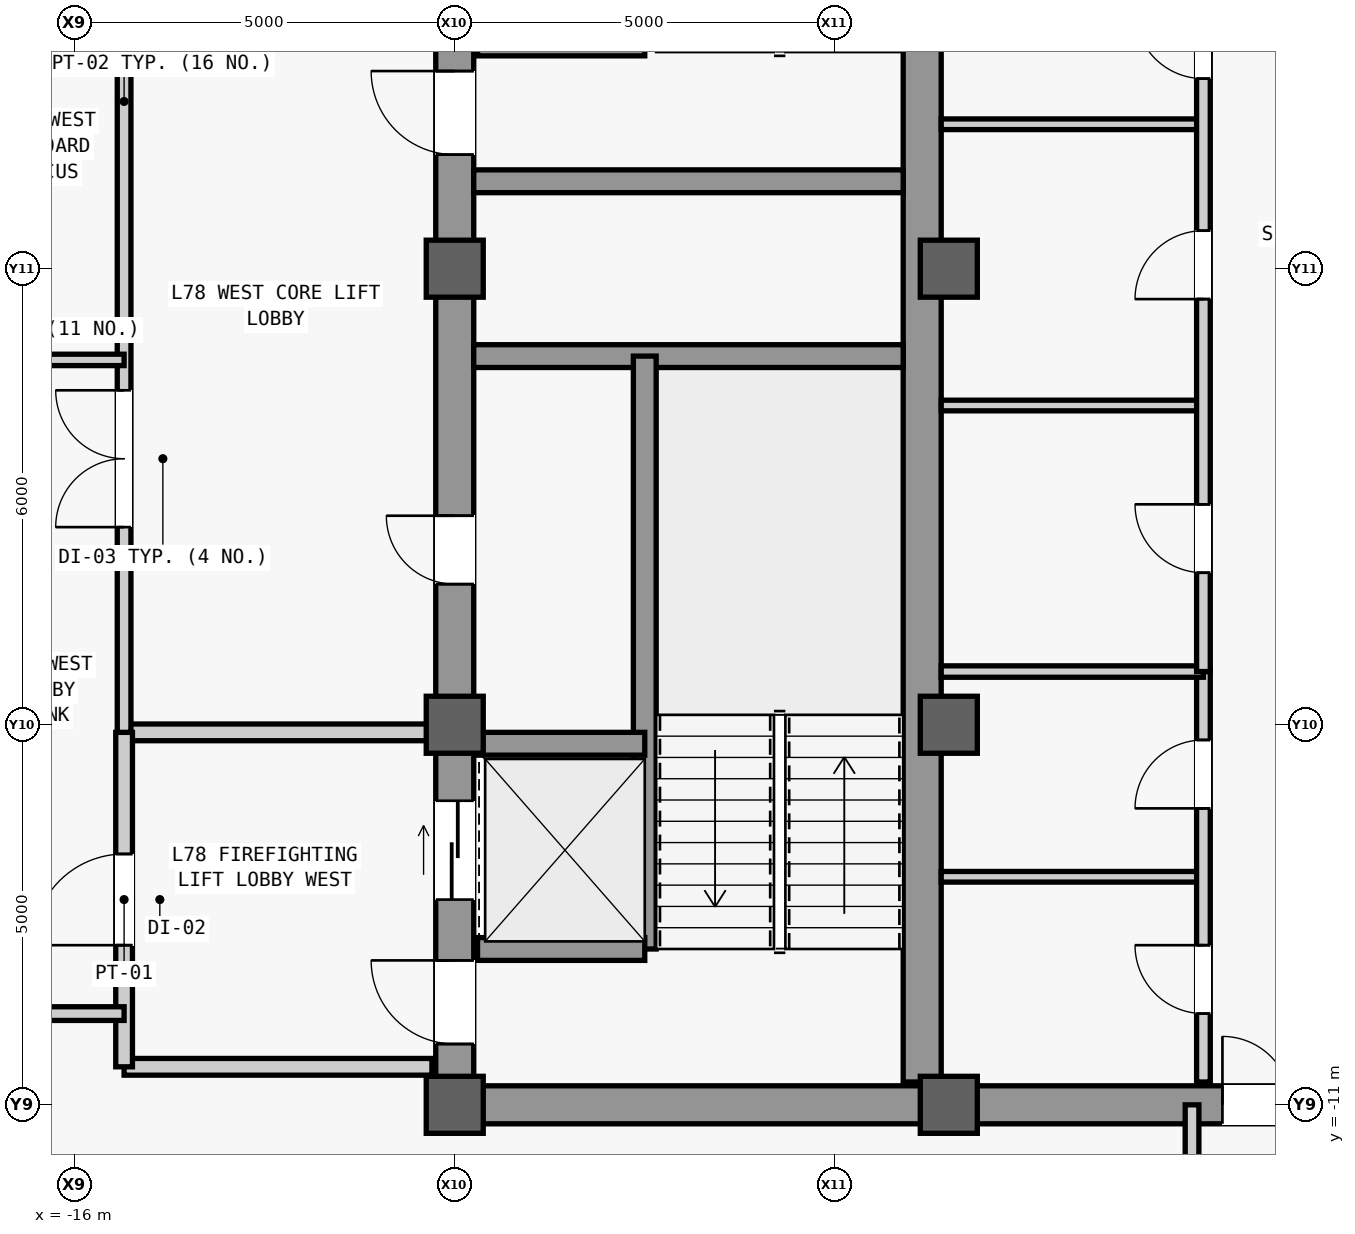
"""IFC4 building model, lengths in metres.
Left out: names, types, materials, properties, quantities, classifications, styles, units other than length and angle.
Written with IfcOpenShell. Run it as: python <this file> out.ifc"""

import sys

from ifc_helpers import new_model, si_unit, direction, frame, frame_2d, origin, origin_2d, place, context, subcontext, project, spatial, rectangle, extrude, source, transform, mapped, element, fill, save


model = new_model("IFC4")
c1 = context("Model", 3, precision=1e-05, world=origin(), true_north=direction((0.0, 1.0)))
c2 = subcontext(c1, "Body", "Model", "MODEL_VIEW")
j1 = project(units=[si_unit("LENGTHUNIT", "METRE"), si_unit("PLANEANGLEUNIT", "RADIAN")], contexts=[c1])
p1 = place(None, origin())
s1 = spatial("IfcSite", under=j1, at=p1, CompositionType="ELEMENT")
p2 = place(p1, origin())
s2 = spatial("IfcBuilding", under=s1, at=p2, CompositionType="ELEMENT")
p3 = place(p2, frame((0.0, 0.0, 330.3)))
s3 = spatial("IfcBuildingStorey", under=s2, at=p3, CompositionType="ELEMENT", Elevation=330.3)
m1 = source(origin(), c2, "Body", "SweptSolid", [
    extrude(rectangle(XDim=22.0, YDim=0.5, at=frame_2d((11.0, 0.0))), origin(), (0.0, 0.0, 1.0), 3.74),
])
p4 = place(p3, frame((-11.0, -11.0, 0.0), z_axis=(0.0, 0.0, 1.0), x_axis=(0.0, 1.0, 0.0)))
e1 = element("IfcWall", 1, at=p4, inside=s3, PredefinedType="SHEAR", context=c2, shape_type="MappedRepresentation", body=[
    mapped(m1, transform((0.0, 0.0, 0.0), scale=1.0)),
])
m2 = source(origin(), c2, "Body", "SweptSolid", [
    extrude(rectangle(XDim=1.1, YDim=2.2, at=frame_2d((0.55, 1.1))), frame((0.0, 0.26, 0.0), z_axis=(0.0, -1.0, 0.0), x_axis=(1.0, 0.0, 0.0)), (0.0, 0.0, 1.0), 0.52),
])
p5 = place(p4, frame((0.8, 0.0, 0.0)))
e2 = element("IfcOpeningElement", 2, at=p5, cuts=e1, PredefinedType="OPENING", context=c2, shape_type="MappedRepresentation", body=[
    mapped(m2, transform((0.0, 0.0, 0.0), scale=1.0)),
])
p6 = place(p4, frame((12.5, 0.0, 0.0)))
e3 = element("IfcOpeningElement", 3, at=p6, cuts=e1, PredefinedType="OPENING", context=c2, shape_type="MappedRepresentation", body=[
    mapped(m2, transform((0.0, 0.0, 0.0), scale=1.0)),
])
m3 = source(origin(), c2, "Body", "SweptSolid", [
    extrude(rectangle(XDim=0.9, YDim=2.15, at=frame_2d((0.45, 1.075))), frame((0.0, 0.26, 0.0), z_axis=(0.0, -1.0, 0.0), x_axis=(1.0, 0.0, 0.0)), (0.0, 0.0, 1.0), 0.52),
])
p7 = place(p4, frame((6.85, 0.0, 0.0)))
e4 = element("IfcOpeningElement", 4, at=p7, cuts=e1, PredefinedType="OPENING", context=c2, shape_type="MappedRepresentation", body=[
    mapped(m3, transform((0.0, 0.0, 0.0), scale=1.0)),
])
m4 = source(origin(), c2, "Body", "SweptSolid", [
    extrude(rectangle(XDim=1.2, YDim=2.3, at=frame_2d((0.6, 1.15))), frame((0.0, 0.26, 0.0), z_axis=(0.0, -1.0, 0.0), x_axis=(1.0, 0.0, 0.0)), (0.0, 0.0, 1.0), 0.52),
])
p8 = place(p4, frame((14.6, 0.0, 0.0)))
e5 = element("IfcOpeningElement", 5, at=p8, cuts=e1, PredefinedType="OPENING", context=c2, shape_type="MappedRepresentation", body=[
    mapped(m4, transform((0.0, 0.0, 0.0), scale=1.0)),
])
p9 = place(p4, frame((18.2, 0.0, 0.0)))
e6 = element("IfcOpeningElement", 6, at=p9, cuts=e1, PredefinedType="OPENING", context=c2, shape_type="MappedRepresentation", body=[
    mapped(m4, transform((0.0, 0.0, 0.0), scale=1.0)),
])
m5 = source(origin(), c2, "Body", "SweptSolid", [
    extrude(rectangle(XDim=1.3, YDim=2.3, at=frame_2d((0.65, 1.15))), frame((0.0, 0.26, 0.0), z_axis=(0.0, -1.0, 0.0), x_axis=(1.0, 0.0, 0.0)), (0.0, 0.0, 1.0), 0.52),
])
p10 = place(p4, frame((2.7, 0.0, 0.0)))
e7 = element("IfcOpeningElement", 7, at=p10, cuts=e1, PredefinedType="OPENING", context=c2, shape_type="MappedRepresentation", body=[
    mapped(m5, transform((0.0, 0.0, 0.0), scale=1.0)),
])
m6 = source(origin(), c2, "Body", "SweptSolid", [
    extrude(rectangle(XDim=21.4, YDim=0.5, at=frame_2d((10.7, 0.0))), origin(), (0.0, 0.0, 1.0), 3.74),
])
p11 = place(p3, frame((-4.85, -10.7, 0.0), z_axis=(0.0, 0.0, 1.0), x_axis=(0.0, 1.0, 0.0)))
e8 = element("IfcWall", 8, at=p11, inside=s3, PredefinedType="SHEAR", context=c2, shape_type="MappedRepresentation", body=[
    mapped(m6, transform((0.0, 0.0, 0.0), scale=1.0)),
])
m7 = source(origin(), c2, "Body", "SweptSolid", [
    extrude(rectangle(XDim=5.9, YDim=0.5, at=frame_2d((2.95, 0.0))), origin(), (0.0, 0.0, 1.0), 3.74),
])
p12 = place(p3, frame((-10.75, -11.0, 0.0), z_axis=(0.0, 0.0, 1.0), x_axis=(1.0, 0.0, 0.0)))
e9 = element("IfcWall", 9, at=p12, inside=s3, PredefinedType="SHEAR", context=c2, shape_type="MappedRepresentation", body=[
    mapped(m7, transform((0.0, 0.0, 0.0), scale=1.0)),
])
m8 = source(origin(), c2, "Body", "SweptSolid", [
    extrude(rectangle(XDim=5.65, YDim=0.3, at=frame_2d((2.825, 0.0))), origin(), (0.0, 0.0, 1.0), 3.74),
])
for number, where, z_axis, x_axis in (
    (10, (-10.75, -1.15, 0.0), (0.0, 0.0, 1.0), (1.0, 0.0, 0.0)),
    (11, (-10.75, 1.15, 0.0), (0.0, 0.0, 1.0), (1.0, 0.0, 0.0)),
):
    element("IfcWall", number, at=place(p3, frame(where, z_axis=z_axis, x_axis=x_axis)), inside=s3, PredefinedType="SHEAR", context=c2, shape_type="MappedRepresentation", body=[
        mapped(m8, transform((0.0, 0.0, 0.0), scale=1.0)),
    ])
m9 = source(origin(), c2, "Body", "SweptSolid", [
    extrude(rectangle(XDim=9.2, YDim=0.5, at=frame_2d((4.6, 0.0))), origin(), (0.0, 0.0, 1.0), 3.74),
])
p13 = place(p3, frame((-4.6, -11.0, 0.0), z_axis=(0.0, 0.0, 1.0), x_axis=(1.0, 0.0, 0.0)))
e12 = element("IfcWall", 12, at=p13, inside=s3, PredefinedType="SHEAR", context=c2, shape_type="MappedRepresentation", body=[
    mapped(m9, transform((0.0, 0.0, 0.0), scale=1.0)),
])
m10 = source(origin(), c2, "Body", "SweptSolid", [
    extrude(rectangle(XDim=1.8, YDim=2.25, at=frame_2d((0.9, 1.125))), frame((0.0, 0.26, 0.0), z_axis=(0.0, -1.0, 0.0), x_axis=(1.0, 0.0, 0.0)), (0.0, 0.0, 1.0), 0.52),
])
p14 = place(p13, frame((3.7, 0.0, 0.0)))
e13 = element("IfcOpeningElement", 13, at=p14, cuts=e12, PredefinedType="OPENING", context=c2, shape_type="MappedRepresentation", body=[
    mapped(m10, transform((0.0, 0.0, 0.0), scale=1.0)),
])
m11 = source(origin(), c2, "Body", "SweptSolid", [
    extrude(rectangle(XDim=0.75, YDim=0.75, at=origin_2d()), origin(), (0.0, 0.0, 1.0), 4.0),
])
for number, where, z_axis, x_axis in (
    (14, (-11.0, -11.0, 0.0), (0.0, 0.0, 1.0), (1.0, 0.0, 0.0)),
    (15, (-11.0, -6.0, 0.0), (0.0, 0.0, 1.0), (1.0, 0.0, 0.0)),
    (16, (-11.0, 0.0, 0.0), (0.0, 0.0, 1.0), (1.0, 0.0, 0.0)),
    (17, (-4.5, -11.0, 0.0), (0.0, 0.0, 1.0), (1.0, 0.0, 0.0)),
    (18, (-4.5, -6.0, 0.0), (0.0, 0.0, 1.0), (1.0, 0.0, 0.0)),
    (19, (-4.5, 0.0, 0.0), (0.0, 0.0, 1.0), (1.0, 0.0, 0.0)),
):
    element("IfcColumn", number, at=place(p3, frame(where, z_axis=z_axis, x_axis=x_axis)), inside=s3, PredefinedType="COLUMN", context=c2, shape_type="MappedRepresentation", body=[
        mapped(m11, transform((0.0, 0.0, 0.0), scale=1.0)),
    ])
m12 = source(origin(), c2, "Body", "SweptSolid", [
    extrude(rectangle(XDim=7.8, YDim=0.3, at=frame_2d((3.9, 0.0))), origin(), (0.0, 0.0, 1.0), 3.74),
])
p15 = place(p3, frame((-8.5, -8.95, 0.0), z_axis=(0.0, 0.0, 1.0), x_axis=(0.0, 1.0, 0.0)))
e20 = element("IfcWall", 20, at=p15, inside=s3, PredefinedType="SHEAR", context=c2, shape_type="MappedRepresentation", body=[
    mapped(m12, transform((0.0, 0.0, 0.0), scale=1.0)),
])
m13 = source(origin(), c2, "Body", "SweptSolid", [
    extrude(rectangle(XDim=2.2, YDim=0.3, at=frame_2d((1.1, 0.0))), origin(), (0.0, 0.0, 1.0), 3.74),
])
for number, where, z_axis, x_axis in (
    (21, (-10.7, -8.95, 0.0), (0.0, 0.0, 1.0), (1.0, 0.0, 0.0)),
    (22, (-10.7, -6.25, 0.0), (0.0, 0.0, 1.0), (1.0, 0.0, 0.0)),
    (23, (-10.7, 2.95, 0.0), (0.0, 0.0, 1.0), (1.0, 0.0, 0.0)),
):
    element("IfcWall", number, at=place(p3, frame(where, z_axis=z_axis, x_axis=x_axis)), inside=s3, PredefinedType="SHEAR", context=c2, shape_type="MappedRepresentation", body=[
        mapped(m13, transform((0.0, 0.0, 0.0), scale=1.0)),
    ])
m14 = source(origin(), c2, "Body", "SweptSolid", [
    extrude(rectangle(XDim=4.05, YDim=0.22, at=frame_2d((2.025, 0.0))), origin(), (0.0, 0.0, 1.0), 3.74),
])
p16 = place(p3, frame((-15.35, -10.5, 0.0), z_axis=(0.0, 0.0, 1.0), x_axis=(1.0, 0.0, 0.0)))
e24 = element("IfcWall", 24, at=p16, inside=s3, PredefinedType="PARTITIONING", context=c2, shape_type="MappedRepresentation", body=[
    mapped(m14, transform((0.0, 0.0, 0.0), scale=1.0)),
])
m15 = source(origin(), c2, "Body", "SweptSolid", [
    extrude(rectangle(XDim=4.05, YDim=0.22, at=frame_2d((2.025, 0.0))), origin(), (0.0, 0.0, 1.0), 3.124),
])
p17 = place(p3, frame((-15.35, -6.1, 0.0), z_axis=(0.0, 0.0, 1.0), x_axis=(1.0, 0.0, 0.0)))
e25 = element("IfcWall", 25, at=p17, inside=s3, PredefinedType="PARTITIONING", context=c2, shape_type="MappedRepresentation", body=[
    mapped(m15, transform((0.0, 0.0, 0.0), scale=1.0)),
])
m16 = source(origin(), c2, "Body", "SweptSolid", [
    extrude(rectangle(XDim=4.4, YDim=0.22, at=frame_2d((2.2, 0.0))), origin(), (0.0, 0.0, 1.0), 3.74),
])
p18 = place(p3, frame((-15.35, -10.5, 0.0), z_axis=(0.0, 0.0, 1.0), x_axis=(0.0, 1.0, 0.0)))
e26 = element("IfcWall", 26, at=p18, inside=s3, PredefinedType="PARTITIONING", context=c2, shape_type="MappedRepresentation", body=[
    mapped(m16, transform((0.0, 0.0, 0.0), scale=1.0)),
])
m17 = source(origin(), c2, "Body", "SweptSolid", [
    extrude(rectangle(XDim=1.2, YDim=2.2, at=frame_2d((0.6, 1.1))), frame((0.0, 0.12, 0.0), z_axis=(0.0, -1.0, 0.0), x_axis=(1.0, 0.0, 0.0)), (0.0, 0.0, 1.0), 0.24),
])
p19 = place(p18, frame((1.6, 0.0, 0.0)))
e27 = element("IfcOpeningElement", 27, at=p19, cuts=e26, PredefinedType="OPENING", context=c2, shape_type="MappedRepresentation", body=[
    mapped(m17, transform((0.0, 0.0, 0.0), scale=1.0)),
])
m18 = source(origin(), c2, "Body", "SweptSolid", [
    extrude(rectangle(XDim=16.6, YDim=0.18, at=frame_2d((8.3, 0.0))), origin(), (0.0, 0.0, 1.0), 3.74),
])
p20 = place(p3, frame((-15.35, -6.1, 0.0), z_axis=(0.0, 0.0, 1.0), x_axis=(0.0, 1.0, 0.0)))
e28 = element("IfcWall", 28, at=p20, inside=s3, PredefinedType="PARTITIONING", context=c2, shape_type="MappedRepresentation", body=[
    mapped(m18, transform((0.0, 0.0, 0.0), scale=1.0)),
])
m19 = source(origin(), c2, "Body", "SweptSolid", [
    extrude(rectangle(XDim=1.8, YDim=2.25, at=frame_2d((0.9, 1.125))), frame((0.0, 0.1, 0.0), z_axis=(0.0, -1.0, 0.0), x_axis=(1.0, 0.0, 0.0)), (0.0, 0.0, 1.0), 0.2),
])
p21 = place(p20, frame((2.7, 0.0, 0.0)))
e29 = element("IfcOpeningElement", 29, at=p21, cuts=e28, PredefinedType="OPENING", context=c2, shape_type="MappedRepresentation", body=[
    mapped(m19, transform((0.0, 0.0, 0.0), scale=1.0)),
])
p22 = place(p20, frame((11.0, 0.0, 0.0)))
e30 = element("IfcOpeningElement", 30, at=p22, cuts=e28, PredefinedType="OPENING", context=c2, shape_type="MappedRepresentation", body=[
    mapped(m19, transform((0.0, 0.0, 0.0), scale=1.0)),
])
m20 = source(origin(), c2, "Body", "SweptSolid", [
    extrude(rectangle(XDim=3.45, YDim=0.14, at=frame_2d((1.725, 0.0))), origin(), (0.0, 0.0, 1.0), 3.74),
])
p23 = place(p3, frame((-4.6, -8.0, 0.0), z_axis=(0.0, 0.0, 1.0), x_axis=(1.0, 0.0, 0.0)))
e31 = element("IfcWall", 31, at=p23, inside=s3, PredefinedType="PARTITIONING", context=c2, shape_type="MappedRepresentation", body=[
    mapped(m20, transform((0.0, 0.0, 0.0), scale=1.0)),
])
m21 = source(origin(), c2, "Body", "SweptSolid", [
    extrude(rectangle(XDim=5.4, YDim=0.18, at=frame_2d((2.7, 0.0))), origin(), (0.0, 0.0, 1.0), 3.74),
])
p24 = place(p3, frame((-1.15, -10.7, 0.0), z_axis=(0.0, 0.0, 1.0), x_axis=(0.0, 1.0, 0.0)))
e32 = element("IfcWall", 32, at=p24, inside=s3, PredefinedType="PARTITIONING", context=c2, shape_type="MappedRepresentation", body=[
    mapped(m21, transform((0.0, 0.0, 0.0), scale=1.0)),
])
m22 = source(origin(), c2, "Body", "SweptSolid", [
    extrude(rectangle(XDim=0.9, YDim=2.15, at=frame_2d((0.45, 1.075))), frame((0.0, 0.1, 0.0), z_axis=(0.0, -1.0, 0.0), x_axis=(1.0, 0.0, 0.0)), (0.0, 0.0, 1.0), 0.2),
])
p25 = place(p24, frame((0.9, 0.0, 0.0)))
e33 = element("IfcOpeningElement", 33, at=p25, cuts=e32, PredefinedType="OPENING", context=c2, shape_type="MappedRepresentation", body=[
    mapped(m22, transform((0.0, 0.0, 0.0), scale=1.0)),
])
p26 = place(p24, frame((3.6, 0.0, 0.0)))
e34 = element("IfcOpeningElement", 34, at=p26, cuts=e32, PredefinedType="OPENING", context=c2, shape_type="MappedRepresentation", body=[
    mapped(m22, transform((0.0, 0.0, 0.0), scale=1.0)),
])
m23 = source(origin(), c2, "Body", "SweptSolid", [
    extrude(rectangle(XDim=3.45, YDim=0.15, at=frame_2d((1.725, 0.0))), origin(), (0.0, 0.0, 1.0), 3.74),
])
p27 = place(p3, frame((-4.6, -5.3, 0.0), z_axis=(0.0, 0.0, 1.0), x_axis=(1.0, 0.0, 0.0)))
e35 = element("IfcWall", 35, at=p27, inside=s3, PredefinedType="PARTITIONING", context=c2, shape_type="MappedRepresentation", body=[
    mapped(m23, transform((0.0, 0.0, 0.0), scale=1.0)),
])
for number, where, z_axis, x_axis in (
    (36, (-4.6, -1.8, 0.0), (0.0, 0.0, 1.0), (1.0, 0.0, 0.0)),
    (37, (-4.6, 1.9, 0.0), (0.0, 0.0, 1.0), (1.0, 0.0, 0.0)),
):
    element("IfcWall", number, at=place(p3, frame(where, z_axis=z_axis, x_axis=x_axis)), inside=s3, PredefinedType="PARTITIONING", context=c2, shape_type="MappedRepresentation", body=[
        mapped(m20, transform((0.0, 0.0, 0.0), scale=1.0)),
    ])
m24 = source(origin(), c2, "Body", "SweptSolid", [
    extrude(rectangle(XDim=10.6, YDim=0.18, at=frame_2d((5.3, 0.0))), origin(), (0.0, 0.0, 1.0), 3.74),
])
p28 = place(p3, frame((-1.15, -5.3, 0.0), z_axis=(0.0, 0.0, 1.0), x_axis=(0.0, 1.0, 0.0)))
e38 = element("IfcWall", 38, at=p28, inside=s3, PredefinedType="PARTITIONING", context=c2, shape_type="MappedRepresentation", body=[
    mapped(m24, transform((0.0, 0.0, 0.0), scale=1.0)),
])
p29 = place(p28, frame((1.3, 0.0, 0.0)))
e39 = element("IfcOpeningElement", 39, at=p29, cuts=e38, PredefinedType="OPENING", context=c2, shape_type="MappedRepresentation", body=[
    mapped(m22, transform((0.0, 0.0, 0.0), scale=1.0)),
])
p30 = place(p28, frame((4.9, 0.0, 0.0)))
e40 = element("IfcOpeningElement", 40, at=p30, cuts=e38, PredefinedType="OPENING", context=c2, shape_type="MappedRepresentation", body=[
    mapped(m22, transform((0.0, 0.0, 0.0), scale=1.0)),
])
p31 = place(p28, frame((7.8, 0.0, 0.0)))
e41 = element("IfcOpeningElement", 41, at=p31, cuts=e38, PredefinedType="OPENING", context=c2, shape_type="MappedRepresentation", body=[
    mapped(m22, transform((0.0, 0.0, 0.0), scale=1.0)),
])
p32 = place(p28, frame((9.475, 0.0, 0.0)))
e42 = element("IfcOpeningElement", 42, at=p32, cuts=e38, PredefinedType="OPENING", context=c2, shape_type="MappedRepresentation", body=[
    mapped(m22, transform((0.0, 0.0, 0.0), scale=1.0)),
])
m25 = source(origin(), c2, "Body", "SweptSolid", [
    extrude(rectangle(XDim=2.05, YDim=0.15, at=frame_2d((1.025, 0.0))), origin(), (0.0, 0.0, 1.0), 3.74),
])
p33 = place(p3, frame((-17.4, -1.2, 0.0), z_axis=(0.0, 0.0, 1.0), x_axis=(1.0, 0.0, 0.0)))
e43 = element("IfcWall", 43, at=p33, inside=s3, PredefinedType="PARTITIONING", context=c2, shape_type="MappedRepresentation", body=[
    mapped(m25, transform((0.0, 0.0, 0.0), scale=1.0)),
])
m26 = source(origin(), c2, "Body", "SweptSolid", [
    extrude(rectangle(XDim=2.05, YDim=0.18, at=frame_2d((1.025, 0.0))), origin(), (0.0, 0.0, 1.0), 3.74),
])
p34 = place(p3, frame((-17.4, -9.8, 0.0), z_axis=(0.0, 0.0, 1.0), x_axis=(1.0, 0.0, 0.0)))
e44 = element("IfcWall", 44, at=p34, inside=s3, PredefinedType="PARTITIONING", context=c2, shape_type="MappedRepresentation", body=[
    mapped(m26, transform((0.0, 0.0, 0.0), scale=1.0)),
])
m27 = source(origin(), c2, "Body", "SweptSolid", [
    extrude(rectangle(XDim=3.2, YDim=0.18, at=frame_2d((1.6, 0.0))), origin(), (0.0, 0.0, 1.0), 3.74),
])
p35 = place(p3, frame((-1.3, -14.2, 0.0), z_axis=(0.0, 0.0, 1.0), x_axis=(0.0, 1.0, 0.0)))
e45 = element("IfcWall", 45, at=p35, inside=s3, PredefinedType="PARTITIONING", context=c2, shape_type="MappedRepresentation", body=[
    mapped(m27, transform((0.0, 0.0, 0.0), scale=1.0)),
])
m28 = source(origin(), c2, "Body", "SweptSolid", [
    extrude(rectangle(XDim=1.1, YDim=2.2, at=frame_2d((0.55, 1.1))), frame((0.0, 0.025, 0.0), z_axis=(0.0, -1.0, 0.0), x_axis=(1.0, 0.0, 0.0)), (0.0, 0.0, 1.0), 0.05),
])
p36 = place(p5, origin())
e46 = element("IfcDoor", 46, at=p36, inside=s3, OperationType="SINGLE_SWING_RIGHT", PredefinedType="DOOR", context=c2, shape_type="MappedRepresentation", body=[
    mapped(m28, transform((0.0, 0.0, 0.0), scale=1.0)),
])
fill(e2, e46)
p37 = place(p6, origin())
e47 = element("IfcDoor", 47, at=p37, inside=s3, OperationType="SINGLE_SWING_RIGHT", PredefinedType="DOOR", context=c2, shape_type="MappedRepresentation", body=[
    mapped(m28, transform((0.0, 0.0, 0.0), scale=1.0)),
])
fill(e3, e47)
m29 = source(origin(), c2, "Body", "SweptSolid", [
    extrude(rectangle(XDim=0.9, YDim=2.15, at=frame_2d((0.45, 1.075))), frame((0.0, 0.025, 0.0), z_axis=(0.0, -1.0, 0.0), x_axis=(1.0, 0.0, 0.0)), (0.0, 0.0, 1.0), 0.05),
])
p38 = place(p7, origin())
e48 = element("IfcDoor", 48, at=p38, inside=s3, OperationType="SINGLE_SWING_RIGHT", PredefinedType="DOOR", context=c2, shape_type="MappedRepresentation", body=[
    mapped(m29, transform((0.0, 0.0, 0.0), scale=1.0)),
])
fill(e4, e48)
m30 = source(origin(), c2, "Body", "SweptSolid", [
    extrude(rectangle(XDim=1.2, YDim=2.2, at=frame_2d((0.6, 1.1))), frame((0.0, 0.025, 0.0), z_axis=(0.0, -1.0, 0.0), x_axis=(1.0, 0.0, 0.0)), (0.0, 0.0, 1.0), 0.05),
])
p39 = place(p19, origin())
e49 = element("IfcDoor", 49, at=p39, inside=s3, OperationType="SINGLE_SWING_LEFT", PredefinedType="DOOR", context=c2, shape_type="MappedRepresentation", body=[
    mapped(m30, transform((0.0, 0.0, 0.0), scale=1.0)),
])
fill(e27, e49)
m31 = source(origin(), c2, "Body", "SweptSolid", [
    extrude(rectangle(XDim=1.8, YDim=2.25, at=frame_2d((0.9, 1.125))), frame((0.0, 0.025, 0.0), z_axis=(0.0, -1.0, 0.0), x_axis=(1.0, 0.0, 0.0)), (0.0, 0.0, 1.0), 0.05),
])
p40 = place(p21, origin())
e50 = element("IfcDoor", 50, at=p40, inside=s3, OperationType="SINGLE_SWING_LEFT", PredefinedType="DOOR", context=c2, shape_type="MappedRepresentation", body=[
    mapped(m31, transform((0.0, 0.0, 0.0), scale=1.0)),
])
fill(e29, e50)
p41 = place(p25, origin())
e51 = element("IfcDoor", 51, at=p41, inside=s3, OperationType="SINGLE_SWING_RIGHT", PredefinedType="DOOR", context=c2, shape_type="MappedRepresentation", body=[
    mapped(m29, transform((0.0, 0.0, 0.0), scale=1.0)),
])
fill(e33, e51)
p42 = place(p26, origin())
e52 = element("IfcDoor", 52, at=p42, inside=s3, OperationType="SINGLE_SWING_LEFT", PredefinedType="DOOR", context=c2, shape_type="MappedRepresentation", body=[
    mapped(m29, transform((0.0, 0.0, 0.0), scale=1.0)),
])
fill(e34, e52)
p43 = place(p14, origin())
e53 = element("IfcDoor", 53, at=p43, inside=s3, OperationType="SINGLE_SWING_LEFT", PredefinedType="DOOR", context=c2, shape_type="MappedRepresentation", body=[
    mapped(m31, transform((0.0, 0.0, 0.0), scale=1.0)),
])
fill(e13, e53)
p44 = place(p29, origin())
e54 = element("IfcDoor", 54, at=p44, inside=s3, OperationType="SINGLE_SWING_RIGHT", PredefinedType="DOOR", context=c2, shape_type="MappedRepresentation", body=[
    mapped(m29, transform((0.0, 0.0, 0.0), scale=1.0)),
])
fill(e39, e54)
p45 = place(p30, origin())
e55 = element("IfcDoor", 55, at=p45, inside=s3, OperationType="SINGLE_SWING_LEFT", PredefinedType="DOOR", context=c2, shape_type="MappedRepresentation", body=[
    mapped(m29, transform((0.0, 0.0, 0.0), scale=1.0)),
])
fill(e40, e55)
p46 = place(p31, origin())
e56 = element("IfcDoor", 56, at=p46, inside=s3, OperationType="SINGLE_SWING_RIGHT", PredefinedType="DOOR", context=c2, shape_type="MappedRepresentation", body=[
    mapped(m29, transform((0.0, 0.0, 0.0), scale=1.0)),
])
fill(e41, e56)
m32 = source(origin(), c2, "Body", "SweptSolid", [
    extrude(rectangle(XDim=1.3, YDim=2.3, at=frame_2d((0.65, 1.15))), frame((0.0, 0.025, 0.0), z_axis=(0.0, -1.0, 0.0), x_axis=(1.0, 0.0, 0.0)), (0.0, 0.0, 1.0), 0.05),
])
p47 = place(p10, origin())
e57 = element("IfcDoor", 57, at=p47, inside=s3, OperationType="SLIDING_TO_LEFT", PredefinedType="DOOR", context=c2, shape_type="MappedRepresentation", body=[
    mapped(m32, transform((0.0, 0.0, 0.0), scale=1.0)),
])
fill(e7, e57)
save(model, sys.argv[1])
